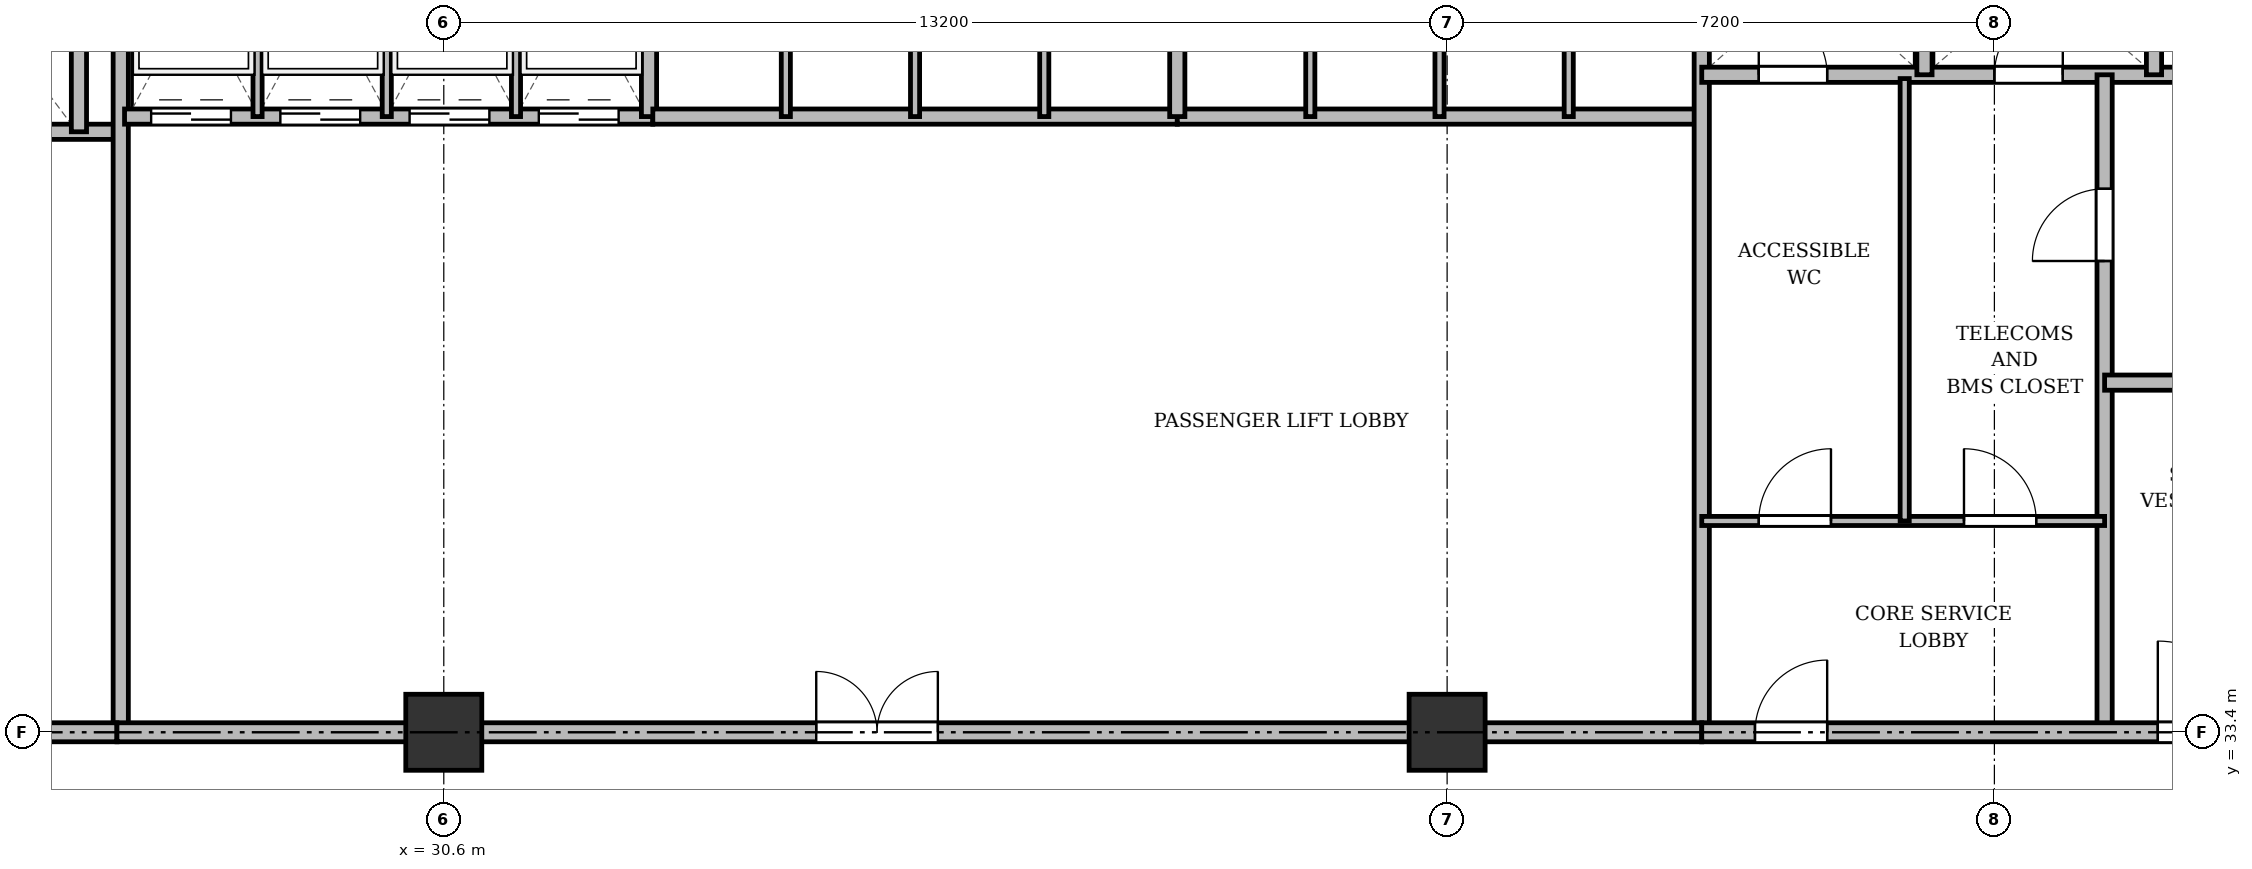
"""IFC4 building model, lengths in metres.
Left out: names, types, materials, properties, quantities, classifications, styles, units other than length and angle.
Written with IfcOpenShell. Run it as: python <this file> out.ifc"""

import sys

from ifc_helpers import new_model, si_unit, direction, frame, frame_2d, origin, origin_2d, place, context, subcontext, project, spatial, rectangle, extrude, source, transform, mapped, element, fill, save


model = new_model("IFC4")
c1 = context("Model", 3, precision=1e-05, world=origin(), true_north=direction((0.0, 1.0)))
c2 = subcontext(c1, "Body", "Model", "MODEL_VIEW")
j1 = project(units=[si_unit("LENGTHUNIT", "METRE"), si_unit("PLANEANGLEUNIT", "RADIAN")], contexts=[c1])
p1 = place(None, origin())
s1 = spatial("IfcSite", under=j1, at=p1, CompositionType="ELEMENT")
p2 = place(p1, origin())
s2 = spatial("IfcBuilding", under=s1, at=p2, CompositionType="ELEMENT")
p3 = place(p2, frame((0.0, 0.0, 18.7)))
s3 = spatial("IfcBuildingStorey", under=s2, at=p3, CompositionType="ELEMENT", Elevation=18.7)
m1 = source(origin(), c2, "Body", "SweptSolid", [
    extrude(rectangle(XDim=1.0, YDim=1.0, at=origin_2d()), origin(), (0.0, 0.0, 1.0), 4.8),
])
for number, where, z_axis, x_axis in (
    (1, (30.6, 33.4, 0.0), (0.0, 0.0, 1.0), (1.0, 0.0, 0.0)),
    (2, (43.8, 33.4, 0.0), (0.0, 0.0, 1.0), (1.0, 0.0, 0.0)),
):
    element("IfcColumn", number, at=place(p3, frame(where, z_axis=z_axis, x_axis=x_axis)), inside=s3, PredefinedType="COLUMN", context=c2, shape_type="MappedRepresentation", body=[
        mapped(m1, transform((0.0, 0.0, 0.0), x_axis=(1.0, 0.0, 0.0), y_axis=(0.0, 1.0, 0.0), z_axis=(0.0, 0.0, 1.0), scale=1.0)),
    ])
p4 = place(p3, frame((19.55, 41.3, 0.0), z_axis=(0.0, 0.0, 1.0), x_axis=(1.0, 0.0, 0.0)))
e3 = element("IfcWall", 3, at=p4, inside=s3, PredefinedType="SOLIDWALL", context=c2, shape_type="SweptSolid", body=[
    extrude(rectangle(XDim=6.75, YDim=0.2, at=frame_2d((3.375, 0.0))), origin(), (0.0, 0.0, 1.0), 4.42),
])
p5 = place(p4, frame((1.7, 0.0, 0.0)))
e4 = element("IfcOpeningElement", 4, at=p5, cuts=e3, PredefinedType="OPENING", context=c2, shape_type="SweptSolid", body=[
    extrude(rectangle(XDim=1.1, YDim=2.15, at=frame_2d((0.55, 1.075))), frame((0.0, 0.11, 0.0), z_axis=(0.0, -1.0, 0.0), x_axis=(1.0, 0.0, 0.0)), (0.0, 0.0, 1.0), 0.22),
])
p6 = place(p4, frame((4.4, 0.0, 0.0)))
e5 = element("IfcOpeningElement", 5, at=p6, cuts=e3, PredefinedType="OPENING", context=c2, shape_type="SweptSolid", body=[
    extrude(rectangle(XDim=1.1, YDim=2.15, at=frame_2d((0.55, 1.075))), frame((0.0, 0.11, 0.0), z_axis=(0.0, -1.0, 0.0), x_axis=(1.0, 0.0, 0.0)), (0.0, 0.0, 1.0), 0.22),
])
p7 = place(p3, frame((25.8, 41.3, 0.0), z_axis=(0.0, 0.0, 1.0), x_axis=(0.0, 1.0, 0.0)))
e6 = element("IfcWall", 6, at=p7, inside=s3, PredefinedType="SOLIDWALL", context=c2, shape_type="SweptSolid", body=[
    extrude(rectangle(XDim=3.4, YDim=0.2, at=frame_2d((1.7, 0.0))), origin(), (0.0, 0.0, 1.0), 4.42),
])
p8 = place(p3, frame((26.35, 33.4, 0.0), z_axis=(0.0, 0.0, 1.0), x_axis=(0.0, 1.0, 0.0)))
e7 = element("IfcWall", 7, at=p8, inside=s3, PredefinedType="SOLIDWALL", context=c2, shape_type="SweptSolid", body=[
    extrude(rectangle(XDim=11.3, YDim=0.2, at=frame_2d((5.65, 0.0))), origin(), (0.0, 0.0, 1.0), 2.62),
])
p9 = place(p3, frame((19.5, 33.4, 0.0), z_axis=(0.0, 0.0, 1.0), x_axis=(1.0, 0.0, 0.0)))
e8 = element("IfcWall", 8, at=p9, inside=s3, PredefinedType="PARTITIONING", context=c2, shape_type="SweptSolid", body=[
    extrude(rectangle(XDim=6.8, YDim=0.25, at=frame_2d((3.4, 0.0))), origin(), (0.0, 0.0, 1.0), 2.62),
])
p10 = place(p9, frame((0.75, 0.0, 0.0)))
e9 = element("IfcOpeningElement", 9, at=p10, cuts=e8, PredefinedType="OPENING", context=c2, shape_type="SweptSolid", body=[
    extrude(rectangle(XDim=1.6, YDim=2.2, at=frame_2d((0.8, 1.1))), frame((0.0, 0.135, 0.0), z_axis=(0.0, -1.0, 0.0), x_axis=(1.0, 0.0, 0.0)), (0.0, 0.0, 1.0), 0.27),
])
p11 = place(p3, frame((26.4, 41.5, 0.0), z_axis=(0.0, 0.0, 1.0), x_axis=(1.0, 0.0, 0.0)))
e10 = element("IfcWall", 10, at=p11, inside=s3, PredefinedType="SOLIDWALL", context=c2, shape_type="SweptSolid", body=[
    extrude(rectangle(XDim=6.95, YDim=0.2, at=frame_2d((3.475, 0.0))), origin(), (0.0, 0.0, 1.0), 4.42),
])
p12 = place(p11, frame((0.35, 0.0, 0.0)))
e11 = element("IfcOpeningElement", 11, at=p12, cuts=e10, PredefinedType="OPENING", context=c2, shape_type="SweptSolid", body=[
    extrude(rectangle(XDim=1.05, YDim=2.15, at=frame_2d((0.525, 1.075))), frame((0.0, 0.11, 0.0), z_axis=(0.0, -1.0, 0.0), x_axis=(1.0, 0.0, 0.0)), (0.0, 0.0, 1.0), 0.22),
])
p13 = place(p11, frame((2.05, 0.0, 0.0)))
e12 = element("IfcOpeningElement", 12, at=p13, cuts=e10, PredefinedType="OPENING", context=c2, shape_type="SweptSolid", body=[
    extrude(rectangle(XDim=1.05, YDim=2.15, at=frame_2d((0.525, 1.075))), frame((0.0, 0.11, 0.0), z_axis=(0.0, -1.0, 0.0), x_axis=(1.0, 0.0, 0.0)), (0.0, 0.0, 1.0), 0.22),
])
p14 = place(p11, frame((3.75, 0.0, 0.0)))
e13 = element("IfcOpeningElement", 13, at=p14, cuts=e10, PredefinedType="OPENING", context=c2, shape_type="SweptSolid", body=[
    extrude(rectangle(XDim=1.05, YDim=2.15, at=frame_2d((0.525, 1.075))), frame((0.0, 0.11, 0.0), z_axis=(0.0, -1.0, 0.0), x_axis=(1.0, 0.0, 0.0)), (0.0, 0.0, 1.0), 0.22),
])
p15 = place(p11, frame((5.45, 0.0, 0.0)))
e14 = element("IfcOpeningElement", 14, at=p15, cuts=e10, PredefinedType="OPENING", context=c2, shape_type="SweptSolid", body=[
    extrude(rectangle(XDim=1.05, YDim=2.15, at=frame_2d((0.525, 1.075))), frame((0.0, 0.11, 0.0), z_axis=(0.0, -1.0, 0.0), x_axis=(1.0, 0.0, 0.0)), (0.0, 0.0, 1.0), 0.22),
])
p16 = place(p3, frame((33.3, 41.5, 0.0), z_axis=(0.0, 0.0, 1.0), x_axis=(0.0, 1.0, 0.0)))
e15 = element("IfcWall", 15, at=p16, inside=s3, PredefinedType="SOLIDWALL", context=c2, shape_type="SweptSolid", body=[
    extrude(rectangle(XDim=3.2, YDim=0.2, at=frame_2d((1.6, 0.0))), origin(), (0.0, 0.0, 1.0), 4.42),
])
for number, where, z_axis, x_axis in (
    (16, (28.15, 41.5, 0.0), (0.0, 0.0, 1.0), (0.0, 1.0, 0.0)),
    (17, (29.85, 41.5, 0.0), (0.0, 0.0, 1.0), (0.0, 1.0, 0.0)),
    (18, (31.55, 41.5, 0.0), (0.0, 0.0, 1.0), (0.0, 1.0, 0.0)),
):
    element("IfcWall", number, at=place(p3, frame(where, z_axis=z_axis, x_axis=x_axis)), inside=s3, PredefinedType="PARTITIONING", context=c2, shape_type="SweptSolid", body=[
        extrude(rectangle(XDim=3.2, YDim=0.12, at=frame_2d((1.6, 0.0))), origin(), (0.0, 0.0, 1.0), 4.42),
    ])
p17 = place(p3, frame((33.35, 41.5, 0.0), z_axis=(0.0, 0.0, 1.0), x_axis=(1.0, 0.0, 0.0)))
e19 = element("IfcWall", 19, at=p17, inside=s3, PredefinedType="SOLIDWALL", context=c2, shape_type="SweptSolid", body=[
    extrude(rectangle(XDim=6.9, YDim=0.2, at=frame_2d((3.45, 0.0))), origin(), (0.0, 0.0, 1.0), 4.42),
])
for number, where, z_axis, x_axis in (
    (20, (35.1, 41.5, 0.0), (0.0, 0.0, 1.0), (0.0, 1.0, 0.0)),
    (21, (36.8, 41.5, 0.0), (0.0, 0.0, 1.0), (0.0, 1.0, 0.0)),
    (22, (38.5, 41.5, 0.0), (0.0, 0.0, 1.0), (0.0, 1.0, 0.0)),
):
    element("IfcWall", number, at=place(p3, frame(where, z_axis=z_axis, x_axis=x_axis)), inside=s3, PredefinedType="PARTITIONING", context=c2, shape_type="SweptSolid", body=[
        extrude(rectangle(XDim=3.2, YDim=0.12, at=frame_2d((1.6, 0.0))), origin(), (0.0, 0.0, 1.0), 4.42),
    ])
p18 = place(p3, frame((40.25, 41.5, 0.0), z_axis=(0.0, 0.0, 1.0), x_axis=(1.0, 0.0, 0.0)))
e23 = element("IfcWall", 23, at=p18, inside=s3, PredefinedType="SOLIDWALL", context=c2, shape_type="SweptSolid", body=[
    extrude(rectangle(XDim=6.9, YDim=0.2, at=frame_2d((3.45, 0.0))), origin(), (0.0, 0.0, 1.0), 2.92),
])
p19 = place(p3, frame((40.25, 41.5, 0.0), z_axis=(0.0, 0.0, 1.0), x_axis=(0.0, 1.0, 0.0)))
e24 = element("IfcWall", 24, at=p19, inside=s3, PredefinedType="SOLIDWALL", context=c2, shape_type="SweptSolid", body=[
    extrude(rectangle(XDim=3.2, YDim=0.2, at=frame_2d((1.6, 0.0))), origin(), (0.0, 0.0, 1.0), 4.42),
])
p20 = place(p3, frame((42.0, 41.5, 0.0), z_axis=(0.0, 0.0, 1.0), x_axis=(0.0, 1.0, 0.0)))
e25 = element("IfcWall", 25, at=p20, inside=s3, PredefinedType="PARTITIONING", context=c2, shape_type="SweptSolid", body=[
    extrude(rectangle(XDim=3.2, YDim=0.12, at=frame_2d((1.6, 0.0))), origin(), (0.0, 0.0, 1.0), 4.42),
])
p21 = place(p3, frame((43.7, 41.5, 0.0), z_axis=(0.0, 0.0, 1.0), x_axis=(0.0, 1.0, 0.0)))
e26 = element("IfcWall", 26, at=p21, inside=s3, PredefinedType="PARTITIONING", context=c2, shape_type="SweptSolid", body=[
    extrude(rectangle(XDim=3.2, YDim=0.12, at=frame_2d((1.6, 0.0))), origin(), (0.0, 0.0, 1.0), 2.92),
])
p22 = place(p3, frame((45.4, 41.5, 0.0), z_axis=(0.0, 0.0, 1.0), x_axis=(0.0, 1.0, 0.0)))
e27 = element("IfcWall", 27, at=p22, inside=s3, PredefinedType="PARTITIONING", context=c2, shape_type="SweptSolid", body=[
    extrude(rectangle(XDim=3.2, YDim=0.12, at=frame_2d((1.6, 0.0))), origin(), (0.0, 0.0, 1.0), 4.42),
])
p23 = place(p3, frame((47.15, 33.4, 0.0), z_axis=(0.0, 0.0, 1.0), x_axis=(0.0, 1.0, 0.0)))
e28 = element("IfcWall", 28, at=p23, inside=s3, PredefinedType="SOLIDWALL", context=c2, shape_type="SweptSolid", body=[
    extrude(rectangle(XDim=11.3, YDim=0.2, at=frame_2d((5.65, 0.0))), origin(), (0.0, 0.0, 1.0), 2.62),
])
p24 = place(p3, frame((26.3, 33.4, 0.0), z_axis=(0.0, 0.0, 1.0), x_axis=(1.0, 0.0, 0.0)))
e29 = element("IfcWall", 29, at=p24, inside=s3, PredefinedType="PARTITIONING", context=c2, shape_type="SweptSolid", body=[
    extrude(rectangle(XDim=20.85, YDim=0.25, at=frame_2d((10.425, 0.0))), origin(), (0.0, 0.0, 1.0), 2.62),
])
p25 = place(p24, frame((9.2, 0.0, 0.0)))
e30 = element("IfcOpeningElement", 30, at=p25, cuts=e29, PredefinedType="OPENING", context=c2, shape_type="SweptSolid", body=[
    extrude(rectangle(XDim=1.6, YDim=2.2, at=frame_2d((0.8, 1.1))), frame((0.0, 0.135, 0.0), z_axis=(0.0, -1.0, 0.0), x_axis=(1.0, 0.0, 0.0)), (0.0, 0.0, 1.0), 0.27),
])
p26 = place(p3, frame((47.15, 42.05, 0.0), z_axis=(0.0, 0.0, 1.0), x_axis=(1.0, 0.0, 0.0)))
e31 = element("IfcWall", 31, at=p26, inside=s3, PredefinedType="SOLIDWALL", context=c2, shape_type="SweptSolid", body=[
    extrude(rectangle(XDim=7.85, YDim=0.2, at=frame_2d((3.925, 0.0))), origin(), (0.0, 0.0, 1.0), 4.42),
])
p27 = place(p26, frame((0.75, 0.0, 0.0)))
e32 = element("IfcOpeningElement", 32, at=p27, cuts=e31, PredefinedType="OPENING", context=c2, shape_type="SweptSolid", body=[
    extrude(rectangle(XDim=0.9, YDim=2.1, at=frame_2d((0.45, 1.05))), frame((0.0, 0.11, 0.0), z_axis=(0.0, -1.0, 0.0), x_axis=(1.0, 0.0, 0.0)), (0.0, 0.0, 1.0), 0.22),
])
p28 = place(p26, frame((3.85, 0.0, 0.0)))
e33 = element("IfcOpeningElement", 33, at=p28, cuts=e31, PredefinedType="OPENING", context=c2, shape_type="SweptSolid", body=[
    extrude(rectangle(XDim=0.9, YDim=2.1, at=frame_2d((0.45, 1.05))), frame((0.0, 0.11, 0.0), z_axis=(0.0, -1.0, 0.0), x_axis=(1.0, 0.0, 0.0)), (0.0, 0.0, 1.0), 0.22),
])
for number, where, z_axis, x_axis in (
    (34, (50.08, 42.05, 0.0), (0.0, 0.0, 1.0), (0.0, 1.0, 0.0)),
    (35, (53.1, 42.05, 0.0), (0.0, 0.0, 1.0), (0.0, 1.0, 0.0)),
):
    element("IfcWall", number, at=place(p3, frame(where, z_axis=z_axis, x_axis=x_axis)), inside=s3, PredefinedType="SOLIDWALL", context=c2, shape_type="SweptSolid", body=[
        extrude(rectangle(XDim=2.65, YDim=0.2, at=frame_2d((1.325, 0.0))), origin(), (0.0, 0.0, 1.0), 4.42),
    ])
p29 = place(p3, frame((52.45, 33.4, 0.0), z_axis=(0.0, 0.0, 1.0), x_axis=(0.0, 1.0, 0.0)))
e36 = element("IfcWall", 36, at=p29, inside=s3, PredefinedType="PARTITIONING", context=c2, shape_type="SweptSolid", body=[
    extrude(rectangle(XDim=8.65, YDim=0.2, at=frame_2d((4.325, 0.0))), origin(), (0.0, 0.0, 1.0), 2.62),
])
p30 = place(p29, frame((6.2, 0.0, 0.0)))
e37 = element("IfcOpeningElement", 37, at=p30, cuts=e36, PredefinedType="OPENING", context=c2, shape_type="SweptSolid", body=[
    extrude(rectangle(XDim=0.95, YDim=2.15, at=frame_2d((0.475, 1.075))), frame((0.0, 0.11, 0.0), z_axis=(0.0, -1.0, 0.0), x_axis=(1.0, 0.0, 0.0)), (0.0, 0.0, 1.0), 0.22),
])
p31 = place(p3, frame((52.45, 38.0, 0.0), z_axis=(0.0, 0.0, 1.0), x_axis=(1.0, 0.0, 0.0)))
e38 = element("IfcWall", 38, at=p31, inside=s3, PredefinedType="PARTITIONING", context=c2, shape_type="SweptSolid", body=[
    extrude(rectangle(XDim=2.55, YDim=0.2, at=frame_2d((1.275, 0.0))), origin(), (0.0, 0.0, 1.0), 4.42),
])
p32 = place(p3, frame((47.15, 36.18, 0.0), z_axis=(0.0, 0.0, 1.0), x_axis=(1.0, 0.0, 0.0)))
e39 = element("IfcWall", 39, at=p32, inside=s3, PredefinedType="PARTITIONING", context=c2, shape_type="SweptSolid", body=[
    extrude(rectangle(XDim=5.3, YDim=0.12, at=frame_2d((2.65, 0.0))), origin(), (0.0, 0.0, 1.0), 4.42),
])
p33 = place(p32, frame((0.75, 0.0, 0.0)))
e40 = element("IfcOpeningElement", 40, at=p33, cuts=e39, PredefinedType="OPENING", context=c2, shape_type="SweptSolid", body=[
    extrude(rectangle(XDim=0.95, YDim=2.15, at=frame_2d((0.475, 1.075))), frame((0.0, 0.07, 0.0), z_axis=(0.0, -1.0, 0.0), x_axis=(1.0, 0.0, 0.0)), (0.0, 0.0, 1.0), 0.14),
])
p34 = place(p32, frame((3.45, 0.0, 0.0)))
e41 = element("IfcOpeningElement", 41, at=p34, cuts=e39, PredefinedType="OPENING", context=c2, shape_type="SweptSolid", body=[
    extrude(rectangle(XDim=0.95, YDim=2.15, at=frame_2d((0.475, 1.075))), frame((0.0, 0.07, 0.0), z_axis=(0.0, -1.0, 0.0), x_axis=(1.0, 0.0, 0.0)), (0.0, 0.0, 1.0), 0.14),
])
p35 = place(p3, frame((49.82, 36.18, 0.0), z_axis=(0.0, 0.0, 1.0), x_axis=(0.0, 1.0, 0.0)))
e42 = element("IfcWall", 42, at=p35, inside=s3, PredefinedType="PARTITIONING", context=c2, shape_type="SweptSolid", body=[
    extrude(rectangle(XDim=5.82, YDim=0.12, at=frame_2d((2.91, 0.0))), origin(), (0.0, 0.0, 1.0), 4.42),
])
p36 = place(p3, frame((47.15, 33.4, 0.0), z_axis=(0.0, 0.0, 1.0), x_axis=(1.0, 0.0, 0.0)))
e43 = element("IfcWall", 43, at=p36, inside=s3, PredefinedType="PARTITIONING", context=c2, shape_type="SweptSolid", body=[
    extrude(rectangle(XDim=11.15, YDim=0.25, at=frame_2d((5.575, 0.0))), origin(), (0.0, 0.0, 1.0), 2.62),
])
p37 = place(p36, frame((0.7, 0.0, 0.0)))
e44 = element("IfcOpeningElement", 44, at=p37, cuts=e43, PredefinedType="OPENING", context=c2, shape_type="SweptSolid", body=[
    extrude(rectangle(XDim=0.95, YDim=2.15, at=frame_2d((0.475, 1.075))), frame((0.0, 0.135, 0.0), z_axis=(0.0, -1.0, 0.0), x_axis=(1.0, 0.0, 0.0)), (0.0, 0.0, 1.0), 0.27),
])
p38 = place(p36, frame((6.0, 0.0, 0.0)))
e45 = element("IfcOpeningElement", 45, at=p38, cuts=e43, PredefinedType="OPENING", context=c2, shape_type="SweptSolid", body=[
    extrude(rectangle(XDim=1.2, YDim=2.15, at=frame_2d((0.6, 1.075))), frame((0.0, 0.135, 0.0), z_axis=(0.0, -1.0, 0.0), x_axis=(1.0, 0.0, 0.0)), (0.0, 0.0, 1.0), 0.27),
])
m2 = source(origin(), c2, "Body", "SweptSolid", [
    extrude(rectangle(XDim=1.05, YDim=2.15, at=frame_2d((0.525, 1.075))), frame((0.0, 0.025, 0.0), z_axis=(0.0, -1.0, 0.0), x_axis=(1.0, 0.0, 0.0)), (0.0, 0.0, 1.0), 0.05),
])
p39 = place(p12, origin())
e46 = element("IfcDoor", 46, at=p39, inside=s3, OperationType="DOUBLE_DOOR_SLIDING", PredefinedType="DOOR", context=c2, shape_type="MappedRepresentation", body=[
    mapped(m2, transform((0.0, 0.0, 0.0), x_axis=(1.0, 0.0, 0.0), y_axis=(0.0, 1.0, 0.0), z_axis=(0.0, 0.0, 1.0), scale=1.0)),
])
fill(e11, e46)
p40 = place(p13, origin())
e47 = element("IfcDoor", 47, at=p40, inside=s3, OperationType="DOUBLE_DOOR_SLIDING", PredefinedType="DOOR", context=c2, shape_type="MappedRepresentation", body=[
    mapped(m2, transform((0.0, 0.0, 0.0), x_axis=(1.0, 0.0, 0.0), y_axis=(0.0, 1.0, 0.0), z_axis=(0.0, 0.0, 1.0), scale=1.0)),
])
fill(e12, e47)
p41 = place(p14, origin())
e48 = element("IfcDoor", 48, at=p41, inside=s3, OperationType="DOUBLE_DOOR_SLIDING", PredefinedType="DOOR", context=c2, shape_type="MappedRepresentation", body=[
    mapped(m2, transform((0.0, 0.0, 0.0), x_axis=(1.0, 0.0, 0.0), y_axis=(0.0, 1.0, 0.0), z_axis=(0.0, 0.0, 1.0), scale=1.0)),
])
fill(e13, e48)
p42 = place(p15, origin())
e49 = element("IfcDoor", 49, at=p42, inside=s3, OperationType="DOUBLE_DOOR_SLIDING", PredefinedType="DOOR", context=c2, shape_type="MappedRepresentation", body=[
    mapped(m2, transform((0.0, 0.0, 0.0), x_axis=(1.0, 0.0, 0.0), y_axis=(0.0, 1.0, 0.0), z_axis=(0.0, 0.0, 1.0), scale=1.0)),
])
fill(e14, e49)
m3 = source(origin(), c2, "Body", "SweptSolid", [
    extrude(rectangle(XDim=1.6, YDim=2.2, at=frame_2d((0.8, 1.1))), frame((0.0, 0.025, 0.0), z_axis=(0.0, -1.0, 0.0), x_axis=(1.0, 0.0, 0.0)), (0.0, 0.0, 1.0), 0.05),
])
p43 = place(p25, origin())
e50 = element("IfcDoor", 50, at=p43, inside=s3, OperationType="DOUBLE_DOOR_SINGLE_SWING", PredefinedType="DOOR", context=c2, shape_type="MappedRepresentation", body=[
    mapped(m3, transform((0.0, 0.0, 0.0), x_axis=(1.0, 0.0, 0.0), y_axis=(0.0, 1.0, 0.0), z_axis=(0.0, 0.0, 1.0), scale=1.0)),
])
fill(e30, e50)
m4 = source(origin(), c2, "Body", "SweptSolid", [
    extrude(rectangle(XDim=0.9, YDim=2.1, at=frame_2d((0.45, 1.05))), frame((0.0, 0.025, 0.0), z_axis=(0.0, -1.0, 0.0), x_axis=(1.0, 0.0, 0.0)), (0.0, 0.0, 1.0), 0.05),
])
p44 = place(p27, origin())
e51 = element("IfcDoor", 51, at=p44, inside=s3, OperationType="SINGLE_SWING_LEFT", PredefinedType="DOOR", context=c2, shape_type="MappedRepresentation", body=[
    mapped(m4, transform((0.0, 0.0, 0.0), x_axis=(1.0, 0.0, 0.0), y_axis=(0.0, 1.0, 0.0), z_axis=(0.0, 0.0, 1.0), scale=1.0)),
])
fill(e32, e51)
p45 = place(p28, origin())
e52 = element("IfcDoor", 52, at=p45, inside=s3, OperationType="SINGLE_SWING_RIGHT", PredefinedType="DOOR", context=c2, shape_type="MappedRepresentation", body=[
    mapped(m4, transform((0.0, 0.0, 0.0), x_axis=(1.0, 0.0, 0.0), y_axis=(0.0, 1.0, 0.0), z_axis=(0.0, 0.0, 1.0), scale=1.0)),
])
fill(e33, e52)
m5 = source(origin(), c2, "Body", "SweptSolid", [
    extrude(rectangle(XDim=0.95, YDim=2.15, at=frame_2d((0.475, 1.075))), frame((0.0, 0.025, 0.0), z_axis=(0.0, -1.0, 0.0), x_axis=(1.0, 0.0, 0.0)), (0.0, 0.0, 1.0), 0.05),
])
p46 = place(p30, origin())
e53 = element("IfcDoor", 53, at=p46, inside=s3, OperationType="SINGLE_SWING_LEFT", PredefinedType="DOOR", context=c2, shape_type="MappedRepresentation", body=[
    mapped(m5, transform((0.0, 0.0, 0.0), x_axis=(1.0, 0.0, 0.0), y_axis=(0.0, 1.0, 0.0), z_axis=(0.0, 0.0, 1.0), scale=1.0)),
])
fill(e37, e53)
p47 = place(p33, origin())
e54 = element("IfcDoor", 54, at=p47, inside=s3, OperationType="SINGLE_SWING_RIGHT", PredefinedType="DOOR", context=c2, shape_type="MappedRepresentation", body=[
    mapped(m5, transform((0.0, 0.0, 0.0), x_axis=(1.0, 0.0, 0.0), y_axis=(0.0, 1.0, 0.0), z_axis=(0.0, 0.0, 1.0), scale=1.0)),
])
fill(e40, e54)
p48 = place(p34, origin())
e55 = element("IfcDoor", 55, at=p48, inside=s3, OperationType="SINGLE_SWING_LEFT", PredefinedType="DOOR", context=c2, shape_type="MappedRepresentation", body=[
    mapped(m5, transform((0.0, 0.0, 0.0), x_axis=(1.0, 0.0, 0.0), y_axis=(0.0, 1.0, 0.0), z_axis=(0.0, 0.0, 1.0), scale=1.0)),
])
fill(e41, e55)
p49 = place(p37, origin())
e56 = element("IfcDoor", 56, at=p49, inside=s3, OperationType="SINGLE_SWING_RIGHT", PredefinedType="DOOR", context=c2, shape_type="MappedRepresentation", body=[
    mapped(m5, transform((0.0, 0.0, 0.0), x_axis=(1.0, 0.0, 0.0), y_axis=(0.0, 1.0, 0.0), z_axis=(0.0, 0.0, 1.0), scale=1.0)),
])
fill(e44, e56)
m6 = source(origin(), c2, "Body", "SweptSolid", [
    extrude(rectangle(XDim=1.2, YDim=2.15, at=frame_2d((0.6, 1.075))), frame((0.0, 0.025, 0.0), z_axis=(0.0, -1.0, 0.0), x_axis=(1.0, 0.0, 0.0)), (0.0, 0.0, 1.0), 0.05),
])
p50 = place(p38, origin())
e57 = element("IfcDoor", 57, at=p50, inside=s3, OperationType="SINGLE_SWING_LEFT", PredefinedType="DOOR", context=c2, shape_type="MappedRepresentation", body=[
    mapped(m6, transform((0.0, 0.0, 0.0), x_axis=(1.0, 0.0, 0.0), y_axis=(0.0, 1.0, 0.0), z_axis=(0.0, 0.0, 1.0), scale=1.0)),
])
fill(e45, e57)
save(model, sys.argv[1])
